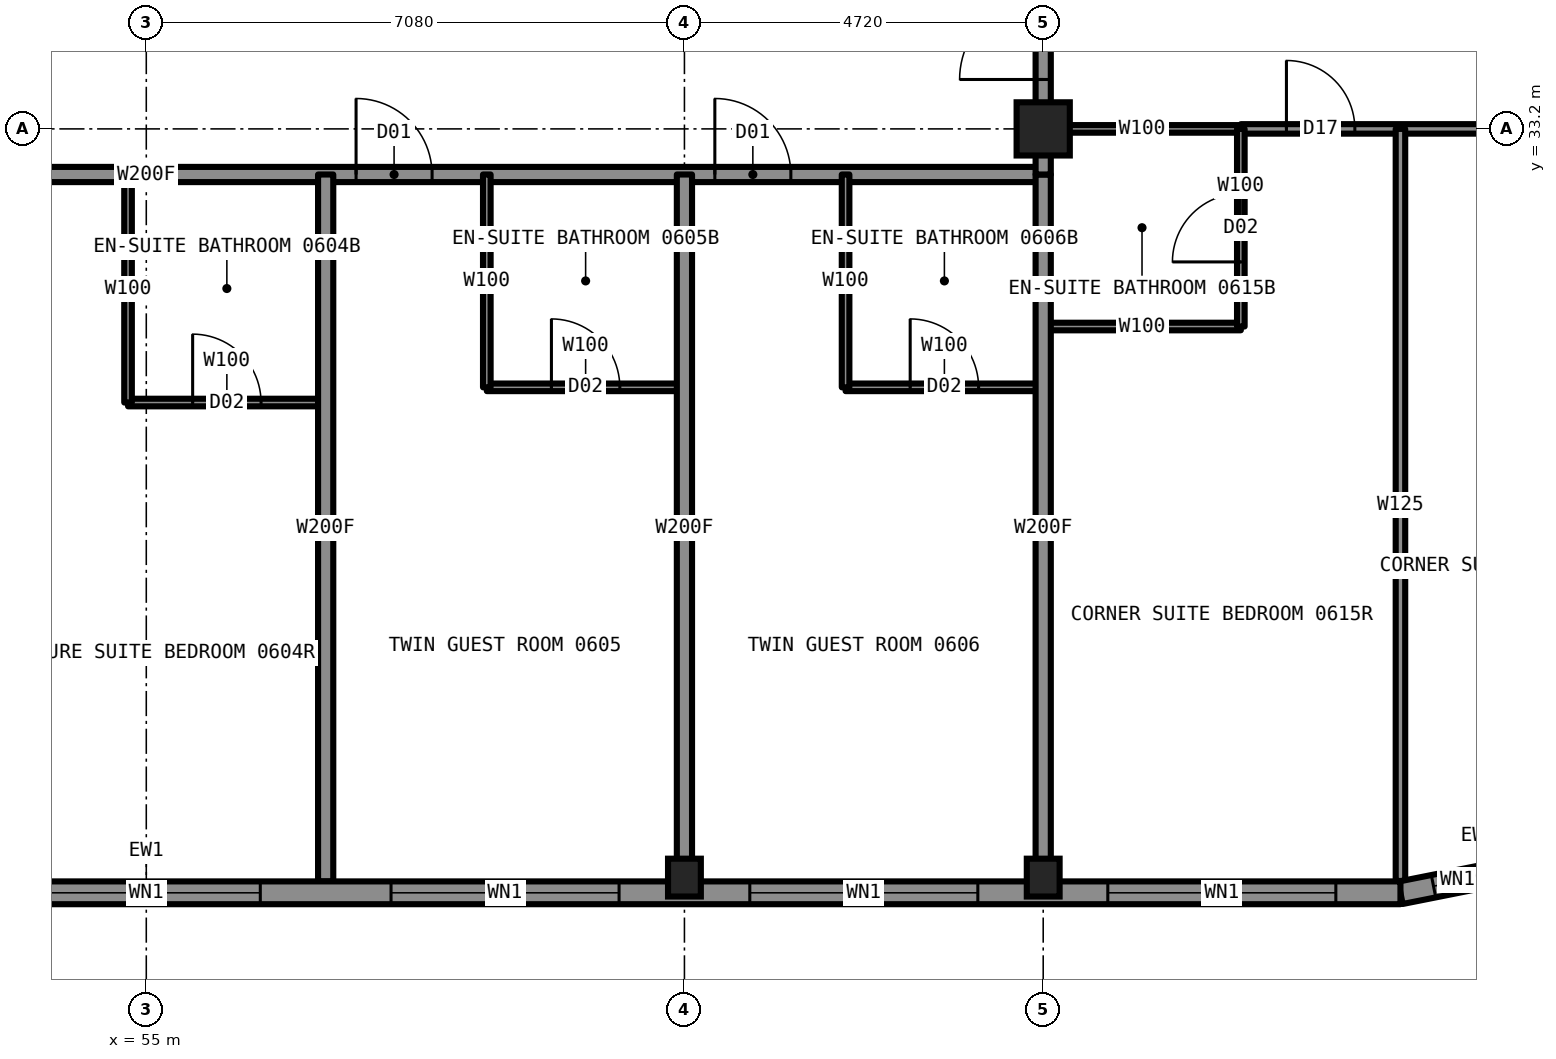
"""IFC4 building model, lengths in metres.
Left out: names, types, materials, properties, quantities, classifications, styles, units other than length and angle.
Written with IfcOpenShell. Run it as: python <this file> out.ifc"""

import sys

from ifc_helpers import new_model, si_unit, direction, frame, frame_2d, origin, origin_2d, place, context, subcontext, project, spatial, rectangle, hollow_rectangle, i_section, extrude, element, fill, save


model = new_model("IFC4")
c1 = context("Model", 3, precision=1e-05, world=origin(), true_north=direction((0.0, 1.0)))
c2 = subcontext(c1, "Body", "Model", "MODEL_VIEW")
j1 = project(units=[si_unit("LENGTHUNIT", "METRE"), si_unit("PLANEANGLEUNIT", "RADIAN")], contexts=[c1])
p1 = place(None, origin())
s1 = spatial("IfcSite", under=j1, at=p1, CompositionType="ELEMENT")
p2 = place(p1, origin())
s2 = spatial("IfcBuilding", under=s1, at=p2, CompositionType="ELEMENT")
p3 = place(p2, frame((0.0, 0.0, 28.5)))
s3 = spatial("IfcBuildingStorey", under=s2, at=p3, CompositionType="ELEMENT", Elevation=28.5)
for number, where, z_axis, x_axis in (
    (1, (62.08, 23.35, 0.0), (0.0, 0.0, 1.0), (1.0, 0.0, 0.0)),
    (2, (66.8, 23.35, 0.0), (0.0, 0.0, 1.0), (1.0, 0.0, 0.0)),
):
    element("IfcColumn", number, at=place(p3, frame(where, z_axis=z_axis, x_axis=x_axis)), inside=s3, PredefinedType="COLUMN", context=c2, shape_type="SweptSolid", body=[
        extrude(i_section(OverallWidth=0.432, OverallDepth=0.498, WebThickness=0.056, FlangeThickness=0.089, at=origin_2d()), origin(), (0.0, 0.0, 1.0), 3.5),
    ])
p4 = place(p3, frame((66.8, 33.2, 0.0), z_axis=(0.0, 0.0, 1.0), x_axis=(1.0, 0.0, 0.0)))
e3 = element("IfcColumn", 3, at=p4, inside=s3, PredefinedType="COLUMN", context=c2, shape_type="SweptSolid", body=[
    extrude(hollow_rectangle(XDim=0.7, YDim=0.7, WallThickness=0.06, at=origin_2d()), origin(), (0.0, 0.0, 1.0), 3.5),
])
p5 = place(p3, frame((66.8, 33.2, 0.0), z_axis=(0.0, 0.0, 1.0), x_axis=(1.0, 0.0, 0.0)))
e4 = element("IfcWall", 4, at=p5, inside=s3, PredefinedType="PARTITIONING", context=c2, shape_type="SweptSolid", body=[
    extrude(rectangle(XDim=2.6, YDim=0.1, at=frame_2d((1.3, 0.0))), origin(), (0.0, 0.0, 1.0), 2.573),
])
p6 = place(p3, frame((69.4, 33.2, 0.0), z_axis=(0.0, 0.0, 1.0), x_axis=(1.0, 0.0, 0.0)))
e5 = element("IfcWall", 5, at=p6, inside=s3, PredefinedType="PARTITIONING", context=c2, shape_type="SweptSolid", body=[
    extrude(rectangle(XDim=7.3, YDim=0.125, at=frame_2d((3.65, 0.0))), origin(), (0.0, 0.0, 1.0), 2.573),
])
p7 = place(p6, frame((0.6, 0.0, 0.0)))
e6 = element("IfcOpeningElement", 6, at=p7, cuts=e5, PredefinedType="OPENING", context=c2, shape_type="SweptSolid", body=[
    extrude(rectangle(XDim=0.9, YDim=2.2, at=frame_2d((0.45, 1.1))), frame((0.0, 0.073, 0.0), z_axis=(0.0, -1.0, 0.0), x_axis=(1.0, 0.0, 0.0)), (0.0, 0.0, 1.0), 0.145),
])
p8 = place(p6, frame((4.4, 0.0, 0.0)))
e7 = element("IfcOpeningElement", 7, at=p8, cuts=e5, PredefinedType="OPENING", context=c2, shape_type="SweptSolid", body=[
    extrude(rectangle(XDim=0.9, YDim=2.2, at=frame_2d((0.45, 1.1))), frame((0.0, 0.073, 0.0), z_axis=(0.0, -1.0, 0.0), x_axis=(1.0, 0.0, 0.0)), (0.0, 0.0, 1.0), 0.145),
])
p9 = place(p3, frame((43.2, 32.6, 0.0), z_axis=(0.0, 0.0, 1.0), x_axis=(1.0, 0.0, 0.0)))
e8 = element("IfcWall", 8, at=p9, inside=s3, PredefinedType="PARTITIONING", context=c2, shape_type="SweptSolid", body=[
    extrude(rectangle(XDim=23.6, YDim=0.2, at=frame_2d((11.8, 0.0))), origin(), (0.0, 0.0, 1.0), 3.33),
])
p10 = place(p9, frame((1.85, 0.0, 0.0)))
e9 = element("IfcOpeningElement", 9, at=p10, cuts=e8, PredefinedType="OPENING", context=c2, shape_type="SweptSolid", body=[
    extrude(rectangle(XDim=1.1, YDim=2.2, at=frame_2d((0.55, 1.1))), frame((0.0, 0.11, 0.0), z_axis=(0.0, -1.0, 0.0), x_axis=(1.0, 0.0, 0.0)), (0.0, 0.0, 1.0), 0.22),
])
p11 = place(p9, frame((14.56, 0.0, 0.0)))
e10 = element("IfcOpeningElement", 10, at=p11, cuts=e8, PredefinedType="OPENING", context=c2, shape_type="SweptSolid", body=[
    extrude(rectangle(XDim=1.0, YDim=2.2, at=frame_2d((0.5, 1.1))), frame((0.0, 0.11, 0.0), z_axis=(0.0, -1.0, 0.0), x_axis=(1.0, 0.0, 0.0)), (0.0, 0.0, 1.0), 0.22),
])
p12 = place(p9, frame((19.28, 0.0, 0.0)))
e11 = element("IfcOpeningElement", 11, at=p12, cuts=e8, PredefinedType="OPENING", context=c2, shape_type="SweptSolid", body=[
    extrude(rectangle(XDim=1.0, YDim=2.2, at=frame_2d((0.5, 1.1))), frame((0.0, 0.11, 0.0), z_axis=(0.0, -1.0, 0.0), x_axis=(1.0, 0.0, 0.0)), (0.0, 0.0, 1.0), 0.22),
])
p13 = place(p3, frame((66.8, 30.6, 0.0), z_axis=(0.0, 0.0, 1.0), x_axis=(1.0, 0.0, 0.0)))
e12 = element("IfcWall", 12, at=p13, inside=s3, PredefinedType="PARTITIONING", context=c2, shape_type="SweptSolid", body=[
    extrude(rectangle(XDim=2.6, YDim=0.1, at=frame_2d((1.3, 0.0))), origin(), (0.0, 0.0, 1.0), 3.33),
])
p14 = place(p3, frame((59.48, 29.8, 0.0), z_axis=(0.0, 0.0, 1.0), x_axis=(1.0, 0.0, 0.0)))
e13 = element("IfcWall", 13, at=p14, inside=s3, PredefinedType="PARTITIONING", context=c2, shape_type="SweptSolid", body=[
    extrude(rectangle(XDim=2.6, YDim=0.1, at=frame_2d((1.3, 0.0))), origin(), (0.0, 0.0, 1.0), 3.33),
])
p15 = place(p14, frame((0.85, 0.0, 0.0)))
e14 = element("IfcOpeningElement", 14, at=p15, cuts=e13, PredefinedType="OPENING", context=c2, shape_type="SweptSolid", body=[
    extrude(rectangle(XDim=0.9, YDim=2.1, at=frame_2d((0.45, 1.05))), frame((0.0, 0.06, 0.0), z_axis=(0.0, -1.0, 0.0), x_axis=(1.0, 0.0, 0.0)), (0.0, 0.0, 1.0), 0.12),
])
p16 = place(p3, frame((64.2, 29.8, 0.0), z_axis=(0.0, 0.0, 1.0), x_axis=(1.0, 0.0, 0.0)))
e15 = element("IfcWall", 15, at=p16, inside=s3, PredefinedType="PARTITIONING", context=c2, shape_type="SweptSolid", body=[
    extrude(rectangle(XDim=2.6, YDim=0.1, at=frame_2d((1.3, 0.0))), origin(), (0.0, 0.0, 1.0), 3.33),
])
p17 = place(p16, frame((0.85, 0.0, 0.0)))
e16 = element("IfcOpeningElement", 16, at=p17, cuts=e15, PredefinedType="OPENING", context=c2, shape_type="SweptSolid", body=[
    extrude(rectangle(XDim=0.9, YDim=2.1, at=frame_2d((0.45, 1.05))), frame((0.0, 0.06, 0.0), z_axis=(0.0, -1.0, 0.0), x_axis=(1.0, 0.0, 0.0)), (0.0, 0.0, 1.0), 0.12),
])
p18 = place(p3, frame((54.76, 29.6, 0.0), z_axis=(0.0, 0.0, 1.0), x_axis=(1.0, 0.0, 0.0)))
e17 = element("IfcWall", 17, at=p18, inside=s3, PredefinedType="PARTITIONING", context=c2, shape_type="SweptSolid", body=[
    extrude(rectangle(XDim=2.6, YDim=0.1, at=frame_2d((1.3, 0.0))), origin(), (0.0, 0.0, 1.0), 3.33),
])
p19 = place(p18, frame((0.85, 0.0, 0.0)))
e18 = element("IfcOpeningElement", 18, at=p19, cuts=e17, PredefinedType="OPENING", context=c2, shape_type="SweptSolid", body=[
    extrude(rectangle(XDim=0.9, YDim=2.1, at=frame_2d((0.45, 1.05))), frame((0.0, 0.06, 0.0), z_axis=(0.0, -1.0, 0.0), x_axis=(1.0, 0.0, 0.0)), (0.0, 0.0, 1.0), 0.12),
])
p20 = place(p3, frame((54.76, 29.6, 0.0), z_axis=(0.0, 0.0, 1.0), x_axis=(0.0, 1.0, 0.0)))
e19 = element("IfcWall", 19, at=p20, inside=s3, PredefinedType="PARTITIONING", context=c2, shape_type="SweptSolid", body=[
    extrude(rectangle(XDim=3.0, YDim=0.1, at=frame_2d((1.5, 0.0))), origin(), (0.0, 0.0, 1.0), 3.33),
])
p21 = place(p3, frame((66.8, 33.22, 0.0), z_axis=(0.0, 0.0, 1.0), x_axis=(0.0, 1.0, 0.0)))
e20 = element("IfcWall", 20, at=p21, inside=s3, PredefinedType="PARTITIONING", context=c2, shape_type="SweptSolid", body=[
    extrude(rectangle(XDim=23.56, YDim=0.2, at=frame_2d((11.78, 0.0))), origin(), (0.0, 0.0, 1.0), 3.33),
])
p22 = place(p21, frame((7.85, 0.0, 0.0)))
e21 = element("IfcOpeningElement", 21, at=p22, cuts=e20, PredefinedType="OPENING", context=c2, shape_type="SweptSolid", body=[
    extrude(rectangle(XDim=1.0, YDim=2.2, at=frame_2d((0.5, 1.1))), frame((0.0, 0.11, 0.0), z_axis=(0.0, -1.0, 0.0), x_axis=(1.0, 0.0, 0.0)), (0.0, 0.0, 1.0), 0.22),
])
p23 = place(p21, frame((12.42, 0.0, 0.0)))
e22 = element("IfcOpeningElement", 22, at=p23, cuts=e20, PredefinedType="OPENING", context=c2, shape_type="SweptSolid", body=[
    extrude(rectangle(XDim=1.0, YDim=2.2, at=frame_2d((0.5, 1.1))), frame((0.0, 0.11, 0.0), z_axis=(0.0, -1.0, 0.0), x_axis=(1.0, 0.0, 0.0)), (0.0, 0.0, 1.0), 0.22),
])
p24 = place(p21, frame((21.83, 0.0, 0.0)))
e23 = element("IfcOpeningElement", 23, at=p24, cuts=e20, PredefinedType="OPENING", context=c2, shape_type="SweptSolid", body=[
    extrude(rectangle(XDim=1.1, YDim=2.2, at=frame_2d((0.55, 1.1))), frame((0.0, 0.11, 0.0), z_axis=(0.0, -1.0, 0.0), x_axis=(1.0, 0.0, 0.0)), (0.0, 0.0, 1.0), 0.22),
])
p25 = place(p21, frame((0.63, 0.0, 0.0)))
e24 = element("IfcOpeningElement", 24, at=p25, cuts=e20, PredefinedType="OPENING", context=c2, shape_type="SweptSolid", body=[
    extrude(rectangle(XDim=1.1, YDim=2.2, at=frame_2d((0.55, 1.1))), frame((0.0, 0.11, 0.0), z_axis=(0.0, -1.0, 0.0), x_axis=(1.0, 0.0, 0.0)), (0.0, 0.0, 1.0), 0.22),
])
p26 = place(p3, frame((66.8, 23.3, 0.0), z_axis=(0.0, 0.0, 1.0), x_axis=(0.0, 1.0, 0.0)))
e25 = element("IfcWall", 25, at=p26, inside=s3, PredefinedType="PARTITIONING", context=c2, shape_type="SweptSolid", body=[
    extrude(rectangle(XDim=9.3, YDim=0.2, at=frame_2d((4.65, 0.0))), origin(), (0.0, 0.0, 1.0), 2.573),
])
p27 = place(p3, frame((69.4, 30.6, 0.0), z_axis=(0.0, 0.0, 1.0), x_axis=(0.0, 1.0, 0.0)))
e26 = element("IfcWall", 26, at=p27, inside=s3, PredefinedType="PARTITIONING", context=c2, shape_type="SweptSolid", body=[
    extrude(rectangle(XDim=2.6, YDim=0.1, at=frame_2d((1.3, 0.0))), origin(), (0.0, 0.0, 1.0), 3.33),
])
p28 = place(p27, frame((0.85, 0.0, 0.0)))
e27 = element("IfcOpeningElement", 27, at=p28, cuts=e26, PredefinedType="OPENING", context=c2, shape_type="SweptSolid", body=[
    extrude(rectangle(XDim=0.9, YDim=2.1, at=frame_2d((0.45, 1.05))), frame((0.0, 0.06, 0.0), z_axis=(0.0, -1.0, 0.0), x_axis=(1.0, 0.0, 0.0)), (0.0, 0.0, 1.0), 0.12),
])
p29 = place(p3, frame((71.5, 23.306, 0.0), z_axis=(0.0, 0.0, 1.0), x_axis=(0.0, 1.0, 0.0)))
e28 = element("IfcWall", 28, at=p29, inside=s3, PredefinedType="PARTITIONING", context=c2, shape_type="SweptSolid", body=[
    extrude(rectangle(XDim=9.894, YDim=0.125, at=frame_2d((4.947, 0.0))), origin(), (0.0, 0.0, 1.0), 3.33),
])
p30 = place(p3, frame((57.36, 23.3, 0.0), z_axis=(0.0, 0.0, 1.0), x_axis=(0.0, 1.0, 0.0)))
e29 = element("IfcWall", 29, at=p30, inside=s3, PredefinedType="PARTITIONING", context=c2, shape_type="SweptSolid", body=[
    extrude(rectangle(XDim=9.3, YDim=0.2, at=frame_2d((4.65, 0.0))), origin(), (0.0, 0.0, 1.0), 3.33),
])
p31 = place(p3, frame((59.48, 29.8, 0.0), z_axis=(0.0, 0.0, 1.0), x_axis=(0.0, 1.0, 0.0)))
e30 = element("IfcWall", 30, at=p31, inside=s3, PredefinedType="PARTITIONING", context=c2, shape_type="SweptSolid", body=[
    extrude(rectangle(XDim=2.8, YDim=0.1, at=frame_2d((1.4, 0.0))), origin(), (0.0, 0.0, 1.0), 3.33),
])
p32 = place(p3, frame((62.08, 23.3, 0.0), z_axis=(0.0, 0.0, 1.0), x_axis=(0.0, 1.0, 0.0)))
e31 = element("IfcWall", 31, at=p32, inside=s3, PredefinedType="PARTITIONING", context=c2, shape_type="SweptSolid", body=[
    extrude(rectangle(XDim=9.3, YDim=0.2, at=frame_2d((4.65, 0.0))), origin(), (0.0, 0.0, 1.0), 2.573),
])
p33 = place(p3, frame((64.2, 29.8, 0.0), z_axis=(0.0, 0.0, 1.0), x_axis=(0.0, 1.0, 0.0)))
e32 = element("IfcWall", 32, at=p33, inside=s3, PredefinedType="PARTITIONING", context=c2, shape_type="SweptSolid", body=[
    extrude(rectangle(XDim=2.8, YDim=0.1, at=frame_2d((1.4, 0.0))), origin(), (0.0, 0.0, 1.0), 3.33),
])
p34 = place(p3, frame((71.5, 23.15, 0.0), z_axis=(0.0, 0.0, 1.0), x_axis=(0.980787050784, 0.195081421501, 0.0)))
e33 = element("IfcWall", 33, at=p34, inside=s3, PredefinedType="SOLIDWALL", context=c2, shape_type="SweptSolid", body=[
    extrude(rectangle(XDim=2.087, YDim=0.3, at=frame_2d((1.044, 0.0))), origin(), (0.0, 0.0, 1.0), 3.33),
])
p35 = place(p34, frame((0.444, 0.0, 0.5)))
e34 = element("IfcOpeningElement", 34, at=p35, cuts=e33, PredefinedType="OPENING", context=c2, shape_type="SweptSolid", body=[
    extrude(rectangle(XDim=0.8, YDim=1.1, at=frame_2d((0.4, 0.55))), frame((0.0, 0.16, 0.0), z_axis=(0.0, -1.0, 0.0), x_axis=(1.0, 0.0, 0.0)), (0.0, 0.0, 1.0), 0.32),
])
p36 = place(p3, frame((38.5, 23.15, 0.0), z_axis=(0.0, 0.0, 1.0), x_axis=(1.0, 0.0, 0.0)))
e35 = element("IfcWall", 35, at=p36, inside=s3, PredefinedType="SOLIDWALL", context=c2, shape_type="SweptSolid", body=[
    extrude(rectangle(XDim=33.0, YDim=0.3, at=frame_2d((16.5, 0.0))), origin(), (0.0, 0.0, 1.0), 2.83),
])
p37 = place(p36, frame((0.85, 0.0, 0.5)))
e36 = element("IfcOpeningElement", 36, at=p37, cuts=e35, PredefinedType="OPENING", context=c2, shape_type="SweptSolid", body=[
    extrude(rectangle(XDim=3.0, YDim=2.0, at=frame_2d((1.5, 1.0))), frame((0.0, 0.16, 0.0), z_axis=(0.0, -1.0, 0.0), x_axis=(1.0, 0.0, 0.0)), (0.0, 0.0, 1.0), 0.32),
])
p38 = place(p36, frame((5.56, 0.0, 0.5)))
e37 = element("IfcOpeningElement", 37, at=p38, cuts=e35, PredefinedType="OPENING", context=c2, shape_type="SweptSolid", body=[
    extrude(rectangle(XDim=3.0, YDim=2.0, at=frame_2d((1.5, 1.0))), frame((0.0, 0.16, 0.0), z_axis=(0.0, -1.0, 0.0), x_axis=(1.0, 0.0, 0.0)), (0.0, 0.0, 1.0), 0.32),
])
p39 = place(p36, frame((10.28, 0.0, 0.5)))
e38 = element("IfcOpeningElement", 38, at=p39, cuts=e35, PredefinedType="OPENING", context=c2, shape_type="SweptSolid", body=[
    extrude(rectangle(XDim=3.0, YDim=2.0, at=frame_2d((1.5, 1.0))), frame((0.0, 0.16, 0.0), z_axis=(0.0, -1.0, 0.0), x_axis=(1.0, 0.0, 0.0)), (0.0, 0.0, 1.0), 0.32),
])
p40 = place(p36, frame((15.0, 0.0, 0.5)))
e39 = element("IfcOpeningElement", 39, at=p40, cuts=e35, PredefinedType="OPENING", context=c2, shape_type="SweptSolid", body=[
    extrude(rectangle(XDim=3.0, YDim=2.0, at=frame_2d((1.5, 1.0))), frame((0.0, 0.16, 0.0), z_axis=(0.0, -1.0, 0.0), x_axis=(1.0, 0.0, 0.0)), (0.0, 0.0, 1.0), 0.32),
])
p41 = place(p36, frame((19.72, 0.0, 0.5)))
e40 = element("IfcOpeningElement", 40, at=p41, cuts=e35, PredefinedType="OPENING", context=c2, shape_type="SweptSolid", body=[
    extrude(rectangle(XDim=3.0, YDim=2.0, at=frame_2d((1.5, 1.0))), frame((0.0, 0.16, 0.0), z_axis=(0.0, -1.0, 0.0), x_axis=(1.0, 0.0, 0.0)), (0.0, 0.0, 1.0), 0.32),
])
p42 = place(p36, frame((24.44, 0.0, 0.5)))
e41 = element("IfcOpeningElement", 41, at=p42, cuts=e35, PredefinedType="OPENING", context=c2, shape_type="SweptSolid", body=[
    extrude(rectangle(XDim=3.0, YDim=2.0, at=frame_2d((1.5, 1.0))), frame((0.0, 0.16, 0.0), z_axis=(0.0, -1.0, 0.0), x_axis=(1.0, 0.0, 0.0)), (0.0, 0.0, 1.0), 0.32),
])
p43 = place(p36, frame((29.15, 0.0, 0.5)))
e42 = element("IfcOpeningElement", 42, at=p43, cuts=e35, PredefinedType="OPENING", context=c2, shape_type="SweptSolid", body=[
    extrude(rectangle(XDim=3.0, YDim=2.0, at=frame_2d((1.5, 1.0))), frame((0.0, 0.16, 0.0), z_axis=(0.0, -1.0, 0.0), x_axis=(1.0, 0.0, 0.0)), (0.0, 0.0, 1.0), 0.32),
])
p44 = place(p3, frame((66.8, 32.6, 0.0), z_axis=(0.0, 0.0, 1.0), x_axis=(0.0, 1.0, 0.0)))
e43 = element("IfcWall", 43, at=p44, inside=s3, PredefinedType="PARTITIONING", context=c2, shape_type="SweptSolid", body=[
    extrude(rectangle(XDim=0.62, YDim=0.2, at=frame_2d((0.31, 0.0))), origin(), (0.0, 0.0, 1.0), 2.573),
])
p45 = place(p19, origin())
e44 = element("IfcDoor", 44, at=p45, inside=s3, OperationType="SINGLE_SWING_RIGHT", PredefinedType="DOOR", context=c2, shape_type="SweptSolid", body=[
    extrude(rectangle(XDim=0.9, YDim=2.1, at=frame_2d((0.45, 1.05))), frame((0.0, 0.025, 0.0), z_axis=(0.0, -1.0, 0.0), x_axis=(1.0, 0.0, 0.0)), (0.0, 0.0, 1.0), 0.05),
])
fill(e18, e44)
p46 = place(p11, origin())
e45 = element("IfcDoor", 45, at=p46, inside=s3, OperationType="SINGLE_SWING_LEFT", PredefinedType="DOOR", context=c2, shape_type="SweptSolid", body=[
    extrude(rectangle(XDim=1.0, YDim=2.2, at=frame_2d((0.5, 1.1))), frame((0.0, 0.025, 0.0), z_axis=(0.0, -1.0, 0.0), x_axis=(1.0, 0.0, 0.0)), (0.0, 0.0, 1.0), 0.05),
])
fill(e10, e45)
p47 = place(p15, origin())
e46 = element("IfcDoor", 46, at=p47, inside=s3, OperationType="SINGLE_SWING_RIGHT", PredefinedType="DOOR", context=c2, shape_type="SweptSolid", body=[
    extrude(rectangle(XDim=0.9, YDim=2.1, at=frame_2d((0.45, 1.05))), frame((0.0, 0.025, 0.0), z_axis=(0.0, -1.0, 0.0), x_axis=(1.0, 0.0, 0.0)), (0.0, 0.0, 1.0), 0.05),
])
fill(e14, e46)
p48 = place(p12, origin())
e47 = element("IfcDoor", 47, at=p48, inside=s3, OperationType="SINGLE_SWING_LEFT", PredefinedType="DOOR", context=c2, shape_type="SweptSolid", body=[
    extrude(rectangle(XDim=1.0, YDim=2.2, at=frame_2d((0.5, 1.1))), frame((0.0, 0.025, 0.0), z_axis=(0.0, -1.0, 0.0), x_axis=(1.0, 0.0, 0.0)), (0.0, 0.0, 1.0), 0.05),
])
fill(e11, e47)
p49 = place(p17, origin())
e48 = element("IfcDoor", 48, at=p49, inside=s3, OperationType="SINGLE_SWING_RIGHT", PredefinedType="DOOR", context=c2, shape_type="SweptSolid", body=[
    extrude(rectangle(XDim=0.9, YDim=2.1, at=frame_2d((0.45, 1.05))), frame((0.0, 0.025, 0.0), z_axis=(0.0, -1.0, 0.0), x_axis=(1.0, 0.0, 0.0)), (0.0, 0.0, 1.0), 0.05),
])
fill(e16, e48)
p50 = place(p25, origin())
e49 = element("IfcDoor", 49, at=p50, inside=s3, OperationType="SINGLE_SWING_LEFT", PredefinedType="DOOR", context=c2, shape_type="SweptSolid", body=[
    extrude(rectangle(XDim=1.1, YDim=2.2, at=frame_2d((0.55, 1.1))), frame((0.0, 0.025, 0.0), z_axis=(0.0, -1.0, 0.0), x_axis=(1.0, 0.0, 0.0)), (0.0, 0.0, 1.0), 0.05),
])
fill(e24, e49)
p51 = place(p28, origin())
e50 = element("IfcDoor", 50, at=p51, inside=s3, OperationType="SINGLE_SWING_RIGHT", PredefinedType="DOOR", context=c2, shape_type="SweptSolid", body=[
    extrude(rectangle(XDim=0.9, YDim=2.1, at=frame_2d((0.45, 1.05))), frame((0.0, 0.025, 0.0), z_axis=(0.0, -1.0, 0.0), x_axis=(1.0, 0.0, 0.0)), (0.0, 0.0, 1.0), 0.05),
])
fill(e27, e50)
p52 = place(p7, origin())
e51 = element("IfcDoor", 51, at=p52, inside=s3, OperationType="SINGLE_SWING_LEFT", PredefinedType="DOOR", context=c2, shape_type="SweptSolid", body=[
    extrude(rectangle(XDim=0.9, YDim=2.2, at=frame_2d((0.45, 1.1))), frame((0.0, 0.025, 0.0), z_axis=(0.0, -1.0, 0.0), x_axis=(1.0, 0.0, 0.0)), (0.0, 0.0, 1.0), 0.05),
])
fill(e6, e51)
p53 = place(p35, origin())
e52 = element("IfcWindow", 52, at=p53, inside=s3, PartitioningType="SINGLE_PANEL", PredefinedType="WINDOW", context=c2, shape_type="SweptSolid", body=[
    extrude(rectangle(XDim=0.8, YDim=1.1, at=frame_2d((0.4, 0.55))), frame((0.0, 0.03, 0.0), z_axis=(0.0, -1.0, 0.0), x_axis=(1.0, 0.0, 0.0)), (0.0, 0.0, 1.0), 0.06),
])
fill(e34, e52)
p54 = place(p40, origin())
e53 = element("IfcWindow", 53, at=p54, inside=s3, PartitioningType="SINGLE_PANEL", PredefinedType="WINDOW", context=c2, shape_type="SweptSolid", body=[
    extrude(rectangle(XDim=3.0, YDim=2.0, at=frame_2d((1.5, 1.0))), frame((0.0, 0.03, 0.0), z_axis=(0.0, -1.0, 0.0), x_axis=(1.0, 0.0, 0.0)), (0.0, 0.0, 1.0), 0.06),
])
fill(e39, e53)
p55 = place(p41, origin())
e54 = element("IfcWindow", 54, at=p55, inside=s3, PartitioningType="SINGLE_PANEL", PredefinedType="WINDOW", context=c2, shape_type="SweptSolid", body=[
    extrude(rectangle(XDim=3.0, YDim=2.0, at=frame_2d((1.5, 1.0))), frame((0.0, 0.03, 0.0), z_axis=(0.0, -1.0, 0.0), x_axis=(1.0, 0.0, 0.0)), (0.0, 0.0, 1.0), 0.06),
])
fill(e40, e54)
p56 = place(p42, origin())
e55 = element("IfcWindow", 55, at=p56, inside=s3, PartitioningType="SINGLE_PANEL", PredefinedType="WINDOW", context=c2, shape_type="SweptSolid", body=[
    extrude(rectangle(XDim=3.0, YDim=2.0, at=frame_2d((1.5, 1.0))), frame((0.0, 0.03, 0.0), z_axis=(0.0, -1.0, 0.0), x_axis=(1.0, 0.0, 0.0)), (0.0, 0.0, 1.0), 0.06),
])
fill(e41, e55)
p57 = place(p43, origin())
e56 = element("IfcWindow", 56, at=p57, inside=s3, PartitioningType="SINGLE_PANEL", PredefinedType="WINDOW", context=c2, shape_type="SweptSolid", body=[
    extrude(rectangle(XDim=3.0, YDim=2.0, at=frame_2d((1.5, 1.0))), frame((0.0, 0.03, 0.0), z_axis=(0.0, -1.0, 0.0), x_axis=(1.0, 0.0, 0.0)), (0.0, 0.0, 1.0), 0.06),
])
fill(e42, e56)
save(model, sys.argv[1])
